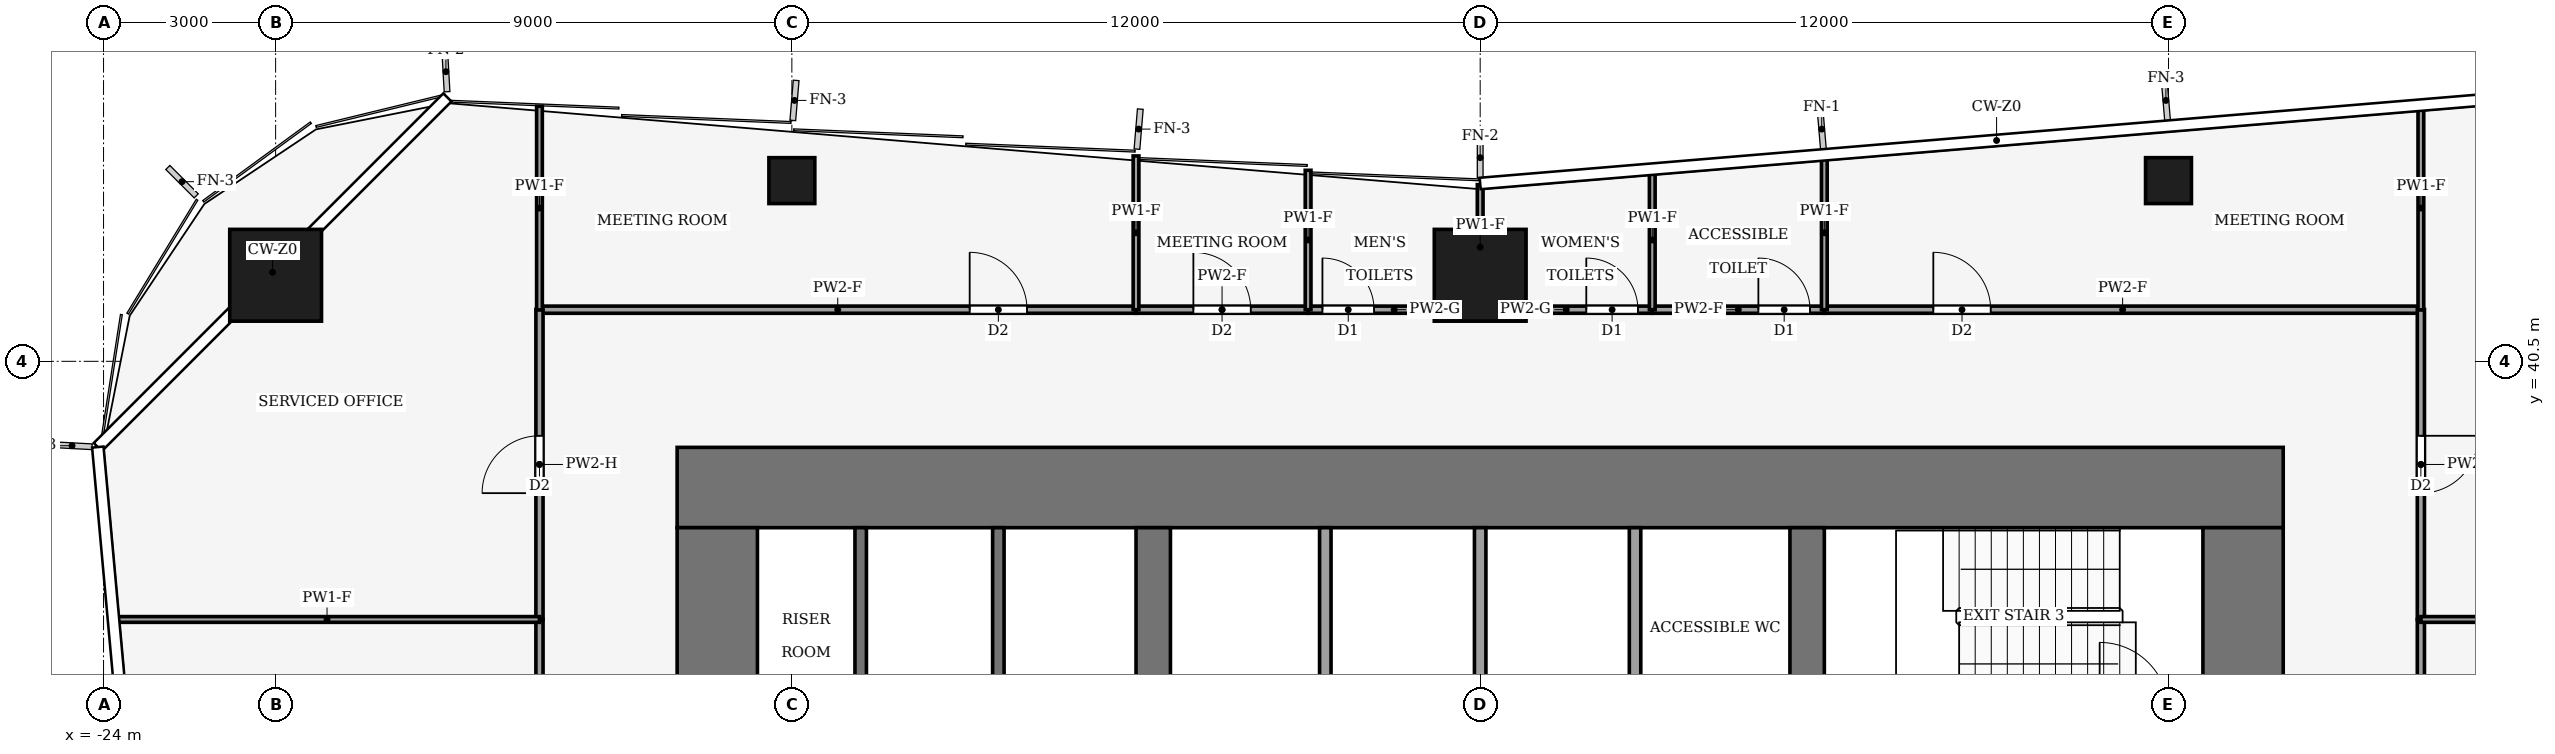
"""IFC4 building model, lengths in metres.
Left out: names, types, materials, properties, quantities, classifications, styles, units other than length and angle.
Written with IfcOpenShell. Run it as: python <this file> out.ifc"""

import sys

from ifc_helpers import new_model, si_unit, direction, frame, frame_2d, origin, origin_2d, place, context, subcontext, project, spatial, rectangle, hollow_rectangle, extrude, element, fill, save


model = new_model("IFC4")
c1 = context("Model", 3, precision=1e-05, world=origin(), true_north=direction((0.0, 1.0)))
c2 = subcontext(c1, "Body", "Model", "MODEL_VIEW")
j1 = project(units=[si_unit("LENGTHUNIT", "METRE"), si_unit("PLANEANGLEUNIT", "RADIAN")], contexts=[c1])
p1 = place(None, origin())
s1 = spatial("IfcSite", under=j1, at=p1, CompositionType="ELEMENT")
p2 = place(p1, origin())
s2 = spatial("IfcBuilding", under=s1, at=p2, CompositionType="ELEMENT")
p3 = place(p2, frame((0.0, 0.0, 26.0)))
s3 = spatial("IfcBuildingStorey", under=s2, at=p3, CompositionType="ELEMENT", Elevation=26.0)
p4 = place(p3, frame((-14.0, 38.3, -0.13), z_axis=(0.0, 0.0, 1.0), x_axis=(1.0, 0.0, 0.0)))
e1 = element("IfcWall", 1, at=p4, inside=s3, PredefinedType="SHEAR", context=c2, shape_type="SweptSolid", body=[
    extrude(rectangle(XDim=28.0, YDim=1.4, at=frame_2d((14.0, 0.0))), origin(), (0.0, 0.0, 1.0), 4.0),
])
p5 = place(p3, frame((-13.3, 18.4, -0.13), z_axis=(0.0, 0.0, 1.0), x_axis=(0.0, 1.0, 0.0)))
e2 = element("IfcWall", 2, at=p5, inside=s3, PredefinedType="SHEAR", context=c2, shape_type="SweptSolid", body=[
    extrude(rectangle(XDim=19.2, YDim=1.4, at=frame_2d((9.6, 0.0))), origin(), (0.0, 0.0, 1.0), 4.0),
])
p6 = place(p5, frame((2.8, 0.0, 0.13)))
e3 = element("IfcOpeningElement", 3, at=p6, cuts=e2, PredefinedType="OPENING", context=c2, shape_type="SweptSolid", body=[
    extrude(rectangle(XDim=2.4, YDim=2.4, at=frame_2d((1.2, 1.2))), frame((0.0, 0.71, 0.0), z_axis=(0.0, -1.0, 0.0), x_axis=(1.0, 0.0, 0.0)), (0.0, 0.0, 1.0), 1.42),
])
p7 = place(p5, frame((13.4, 0.0, 0.13)))
e4 = element("IfcOpeningElement", 4, at=p7, cuts=e2, PredefinedType="OPENING", context=c2, shape_type="SweptSolid", body=[
    extrude(rectangle(XDim=1.4, YDim=2.2, at=frame_2d((0.7, 1.1))), frame((0.0, 0.71, 0.0), z_axis=(0.0, -1.0, 0.0), x_axis=(1.0, 0.0, 0.0)), (0.0, 0.0, 1.0), 1.42),
])
p8 = place(p3, frame((13.3, 18.4, -0.13), z_axis=(0.0, 0.0, 1.0), x_axis=(0.0, 1.0, 0.0)))
e5 = element("IfcWall", 5, at=p8, inside=s3, PredefinedType="SHEAR", context=c2, shape_type="SweptSolid", body=[
    extrude(rectangle(XDim=19.2, YDim=1.4, at=frame_2d((9.6, 0.0))), origin(), (0.0, 0.0, 1.0), 4.0),
])
p9 = place(p8, frame((2.8, 0.0, 0.13)))
e6 = element("IfcOpeningElement", 6, at=p9, cuts=e5, PredefinedType="OPENING", context=c2, shape_type="SweptSolid", body=[
    extrude(rectangle(XDim=2.4, YDim=2.4, at=frame_2d((1.2, 1.2))), frame((0.0, 0.71, 0.0), z_axis=(0.0, -1.0, 0.0), x_axis=(1.0, 0.0, 0.0)), (0.0, 0.0, 1.0), 1.42),
])
p10 = place(p8, frame((13.3, 0.0, 0.13)))
e7 = element("IfcOpeningElement", 7, at=p10, cuts=e5, PredefinedType="OPENING", context=c2, shape_type="SweptSolid", body=[
    extrude(rectangle(XDim=2.4, YDim=2.4, at=frame_2d((1.2, 1.2))), frame((0.0, 0.71, 0.0), z_axis=(0.0, -1.0, 0.0), x_axis=(1.0, 0.0, 0.0)), (0.0, 0.0, 1.0), 1.42),
])
p11 = place(p3, frame((-5.7, 18.4, -0.13), z_axis=(0.0, 0.0, 1.0), x_axis=(0.0, 1.0, 0.0)))
e8 = element("IfcWall", 8, at=p11, inside=s3, PredefinedType="SHEAR", context=c2, shape_type="SweptSolid", body=[
    extrude(rectangle(XDim=19.2, YDim=0.6, at=frame_2d((9.6, 0.0))), origin(), (0.0, 0.0, 1.0), 4.0),
])
p12 = place(p11, frame((8.35, 0.0, 0.13)))
e9 = element("IfcOpeningElement", 9, at=p12, cuts=e8, PredefinedType="OPENING", context=c2, shape_type="SweptSolid", body=[
    extrude(rectangle(XDim=0.9, YDim=2.1, at=frame_2d((0.45, 1.05))), frame((0.0, 0.31, 0.0), z_axis=(0.0, -1.0, 0.0), x_axis=(1.0, 0.0, 0.0)), (0.0, 0.0, 1.0), 0.62),
])
p13 = place(p3, frame((5.7, 18.4, -0.13), z_axis=(0.0, 0.0, 1.0), x_axis=(0.0, 1.0, 0.0)))
e10 = element("IfcWall", 10, at=p13, inside=s3, PredefinedType="SHEAR", context=c2, shape_type="SweptSolid", body=[
    extrude(rectangle(XDim=19.2, YDim=0.6, at=frame_2d((9.6, 0.0))), origin(), (0.0, 0.0, 1.0), 4.0),
])
p14 = place(p13, frame((13.3, 0.0, 0.13)))
e11 = element("IfcOpeningElement", 11, at=p14, cuts=e10, PredefinedType="OPENING", context=c2, shape_type="SweptSolid", body=[
    extrude(rectangle(XDim=2.4, YDim=2.4, at=frame_2d((1.2, 1.2))), frame((0.0, 0.31, 0.0), z_axis=(0.0, -1.0, 0.0), x_axis=(1.0, 0.0, 0.0)), (0.0, 0.0, 1.0), 0.62),
])
for number, where, z_axis, x_axis in (
    (12, (-21.0, 42.0, 0.0), (0.0, 0.0, 1.0), (1.0, 0.0, 0.0)),
    (13, (0.0, 42.0, 0.0), (0.0, 0.0, 1.0), (1.0, 0.0, 0.0)),
):
    element("IfcColumn", number, at=place(p3, frame(where, z_axis=z_axis, x_axis=x_axis)), inside=s3, PredefinedType="COLUMN", context=c2, shape_type="SweptSolid", body=[
        extrude(hollow_rectangle(XDim=1.6, YDim=1.6, WallThickness=0.09, at=origin_2d()), origin(), (0.0, 0.0, 1.0), 4.0),
    ])
for number, where, z_axis, x_axis in (
    (14, (-12.0, 43.65, 0.0), (0.0, 0.0, 1.0), (1.0, 0.0, 0.0)),
    (15, (12.0, 43.65, 0.0), (0.0, 0.0, 1.0), (1.0, 0.0, 0.0)),
):
    element("IfcColumn", number, at=place(p3, frame(where, z_axis=z_axis, x_axis=x_axis)), inside=s3, PredefinedType="COLUMN", context=c2, shape_type="SweptSolid", body=[
        extrude(hollow_rectangle(XDim=0.8, YDim=0.8, WallThickness=0.04, at=origin_2d()), origin(), (0.0, 0.0, 1.0), 4.0),
    ])
for number, where, z_axis, x_axis in (
    (16, (-10.8, 34.0, 0.0), (0.0, 0.0, 1.0), (0.0, 1.0, 0.0)),
    (17, (-8.4, 34.0, 0.0), (0.0, 0.0, 1.0), (0.0, 1.0, 0.0)),
    (18, (-2.7, 34.0, 0.0), (0.0, 0.0, 1.0), (0.0, 1.0, 0.0)),
    (19, (0.0, 34.0, 0.0), (0.0, 0.0, 1.0), (0.0, 1.0, 0.0)),
    (20, (2.7, 34.0, 0.0), (0.0, 0.0, 1.0), (0.0, 1.0, 0.0)),
):
    element("IfcWall", number, at=place(p3, frame(where, z_axis=z_axis, x_axis=x_axis)), inside=s3, PredefinedType="PARTITIONING", context=c2, shape_type="SweptSolid", body=[
        extrude(rectangle(XDim=3.6, YDim=0.2, at=frame_2d((1.8, 0.0))), origin(), (0.0, 0.0, 1.0), 3.87),
    ])
p15 = place(p3, frame((-16.4, 41.4, 0.0), z_axis=(0.0, 0.0, 1.0), x_axis=(1.0, 0.0, 0.0)))
e21 = element("IfcWall", 21, at=p15, inside=s3, PredefinedType="PARTITIONING", context=c2, shape_type="SweptSolid", body=[
    extrude(rectangle(XDim=10.4, YDim=0.125, at=frame_2d((5.2, 0.0))), origin(), (0.0, 0.0, 1.0), 3.54),
])
p16 = place(p15, frame((7.5, 0.0, 0.0)))
e22 = element("IfcOpeningElement", 22, at=p16, cuts=e21, PredefinedType="OPENING", context=c2, shape_type="SweptSolid", body=[
    extrude(rectangle(XDim=1.0, YDim=2.1, at=frame_2d((0.5, 1.05))), frame((0.0, 0.073, 0.0), z_axis=(0.0, -1.0, 0.0), x_axis=(1.0, 0.0, 0.0)), (0.0, 0.0, 1.0), 0.145),
])
p17 = place(p3, frame((-6.0, 41.4, 0.0), z_axis=(0.0, 0.0, 1.0), x_axis=(1.0, 0.0, 0.0)))
e23 = element("IfcWall", 23, at=p17, inside=s3, PredefinedType="PARTITIONING", context=c2, shape_type="SweptSolid", body=[
    extrude(rectangle(XDim=3.0, YDim=0.125, at=frame_2d((1.5, 0.0))), origin(), (0.0, 0.0, 1.0), 3.54),
])
p18 = place(p17, frame((1.0, 0.0, 0.0)))
e24 = element("IfcOpeningElement", 24, at=p18, cuts=e23, PredefinedType="OPENING", context=c2, shape_type="SweptSolid", body=[
    extrude(rectangle(XDim=1.0, YDim=2.1, at=frame_2d((0.5, 1.05))), frame((0.0, 0.073, 0.0), z_axis=(0.0, -1.0, 0.0), x_axis=(1.0, 0.0, 0.0)), (0.0, 0.0, 1.0), 0.145),
])
p19 = place(p3, frame((-3.0, 41.4, 0.0), z_axis=(0.0, 0.0, 1.0), x_axis=(1.0, 0.0, 0.0)))
e25 = element("IfcWall", 25, at=p19, inside=s3, PredefinedType="PARTITIONING", context=c2, shape_type="SweptSolid", body=[
    extrude(rectangle(XDim=3.0, YDim=0.125, at=frame_2d((1.5, 0.0))), origin(), (0.0, 0.0, 1.0), 3.87),
])
p20 = place(p19, frame((0.25, 0.0, 0.0)))
e26 = element("IfcOpeningElement", 26, at=p20, cuts=e25, PredefinedType="OPENING", context=c2, shape_type="SweptSolid", body=[
    extrude(rectangle(XDim=0.9, YDim=2.1, at=frame_2d((0.45, 1.05))), frame((0.0, 0.073, 0.0), z_axis=(0.0, -1.0, 0.0), x_axis=(1.0, 0.0, 0.0)), (0.0, 0.0, 1.0), 0.145),
])
p21 = place(p3, frame((0.0, 41.4, 0.0), z_axis=(0.0, 0.0, 1.0), x_axis=(1.0, 0.0, 0.0)))
e27 = element("IfcWall", 27, at=p21, inside=s3, PredefinedType="PARTITIONING", context=c2, shape_type="SweptSolid", body=[
    extrude(rectangle(XDim=3.0, YDim=0.125, at=frame_2d((1.5, 0.0))), origin(), (0.0, 0.0, 1.0), 3.87),
])
p22 = place(p21, frame((1.85, 0.0, 0.0)))
e28 = element("IfcOpeningElement", 28, at=p22, cuts=e27, PredefinedType="OPENING", context=c2, shape_type="SweptSolid", body=[
    extrude(rectangle(XDim=0.9, YDim=2.1, at=frame_2d((0.45, 1.05))), frame((0.0, 0.073, 0.0), z_axis=(0.0, -1.0, 0.0), x_axis=(1.0, 0.0, 0.0)), (0.0, 0.0, 1.0), 0.145),
])
p23 = place(p3, frame((3.0, 41.4, 0.0), z_axis=(0.0, 0.0, 1.0), x_axis=(1.0, 0.0, 0.0)))
e29 = element("IfcWall", 29, at=p23, inside=s3, PredefinedType="PARTITIONING", context=c2, shape_type="SweptSolid", body=[
    extrude(rectangle(XDim=3.0, YDim=0.125, at=frame_2d((1.5, 0.0))), origin(), (0.0, 0.0, 1.0), 3.54),
])
p24 = place(p23, frame((1.85, 0.0, 0.0)))
e30 = element("IfcOpeningElement", 30, at=p24, cuts=e29, PredefinedType="OPENING", context=c2, shape_type="SweptSolid", body=[
    extrude(rectangle(XDim=0.9, YDim=2.1, at=frame_2d((0.45, 1.05))), frame((0.0, 0.073, 0.0), z_axis=(0.0, -1.0, 0.0), x_axis=(1.0, 0.0, 0.0)), (0.0, 0.0, 1.0), 0.145),
])
p25 = place(p3, frame((6.0, 41.4, 0.0), z_axis=(0.0, 0.0, 1.0), x_axis=(1.0, 0.0, 0.0)))
e31 = element("IfcWall", 31, at=p25, inside=s3, PredefinedType="PARTITIONING", context=c2, shape_type="SweptSolid", body=[
    extrude(rectangle(XDim=10.4, YDim=0.125, at=frame_2d((5.2, 0.0))), origin(), (0.0, 0.0, 1.0), 3.54),
])
p26 = place(p25, frame((1.9, 0.0, 0.0)))
e32 = element("IfcOpeningElement", 32, at=p26, cuts=e31, PredefinedType="OPENING", context=c2, shape_type="SweptSolid", body=[
    extrude(rectangle(XDim=1.0, YDim=2.1, at=frame_2d((0.5, 1.05))), frame((0.0, 0.073, 0.0), z_axis=(0.0, -1.0, 0.0), x_axis=(1.0, 0.0, 0.0)), (0.0, 0.0, 1.0), 0.145),
])
p27 = place(p3, frame((-16.4, 24.0, 0.0), z_axis=(0.0, 0.0, 1.0), x_axis=(0.0, 1.0, 0.0)))
e33 = element("IfcWall", 33, at=p27, inside=s3, PredefinedType="PARTITIONING", context=c2, shape_type="SweptSolid", body=[
    extrude(rectangle(XDim=12.0, YDim=0.125, at=frame_2d((6.0, 0.0))), origin(), (0.0, 0.0, 1.0), 3.48),
])
p28 = place(p27, frame((5.5, 0.0, 0.0)))
e34 = element("IfcOpeningElement", 34, at=p28, cuts=e33, PredefinedType="OPENING", context=c2, shape_type="SweptSolid", body=[
    extrude(rectangle(XDim=1.0, YDim=2.1, at=frame_2d((0.5, 1.05))), frame((0.0, 0.073, 0.0), z_axis=(0.0, -1.0, 0.0), x_axis=(1.0, 0.0, 0.0)), (0.0, 0.0, 1.0), 0.145),
])
p29 = place(p3, frame((-16.4, 36.0, 0.0), z_axis=(0.0, 0.0, 1.0), x_axis=(0.0, 1.0, 0.0)))
e35 = element("IfcWall", 35, at=p29, inside=s3, PredefinedType="PARTITIONING", context=c2, shape_type="SweptSolid", body=[
    extrude(rectangle(XDim=5.404, YDim=0.125, at=frame_2d((2.702, 0.0))), origin(), (0.0, 0.0, 1.0), 3.14),
])
p30 = place(p29, frame((2.202, 0.0, 0.0)))
e36 = element("IfcOpeningElement", 36, at=p30, cuts=e35, PredefinedType="OPENING", context=c2, shape_type="SweptSolid", body=[
    extrude(rectangle(XDim=1.0, YDim=2.1, at=frame_2d((0.5, 1.05))), frame((0.0, 0.073, 0.0), z_axis=(0.0, -1.0, 0.0), x_axis=(1.0, 0.0, 0.0)), (0.0, 0.0, 1.0), 0.145),
])
p31 = place(p3, frame((16.4, 36.0, 0.0), z_axis=(0.0, 0.0, 1.0), x_axis=(0.0, -1.0, 0.0)))
e37 = element("IfcWall", 37, at=p31, inside=s3, PredefinedType="PARTITIONING", context=c2, shape_type="SweptSolid", body=[
    extrude(rectangle(XDim=3.0, YDim=0.125, at=frame_2d((1.5, 0.0))), origin(), (0.0, 0.0, 1.0), 3.48),
])
p32 = place(p31, frame((1.0, 0.0, 0.0)))
e38 = element("IfcOpeningElement", 38, at=p32, cuts=e37, PredefinedType="OPENING", context=c2, shape_type="SweptSolid", body=[
    extrude(rectangle(XDim=1.0, YDim=2.1, at=frame_2d((0.5, 1.05))), frame((0.0, 0.073, 0.0), z_axis=(0.0, -1.0, 0.0), x_axis=(1.0, 0.0, 0.0)), (0.0, 0.0, 1.0), 0.145),
])
p33 = place(p3, frame((16.4, 41.404, 0.0), z_axis=(0.0, 0.0, 1.0), x_axis=(0.0, -1.0, 0.0)))
e39 = element("IfcWall", 39, at=p33, inside=s3, PredefinedType="PARTITIONING", context=c2, shape_type="SweptSolid", body=[
    extrude(rectangle(XDim=5.404, YDim=0.125, at=frame_2d((2.702, 0.0))), origin(), (0.0, 0.0, 1.0), 3.14),
])
p34 = place(p33, frame((2.202, 0.0, 0.0)))
e40 = element("IfcOpeningElement", 40, at=p34, cuts=e39, PredefinedType="OPENING", context=c2, shape_type="SweptSolid", body=[
    extrude(rectangle(XDim=1.0, YDim=2.1, at=frame_2d((0.5, 1.05))), frame((0.0, 0.073, 0.0), z_axis=(0.0, -1.0, 0.0), x_axis=(1.0, 0.0, 0.0)), (0.0, 0.0, 1.0), 0.145),
])
p35 = place(p3, frame((-6.0, 41.4, 0.0), z_axis=(0.0, 0.0, 1.0), x_axis=(0.0, 1.0, 0.0)))
e41 = element("IfcWall", 41, at=p35, inside=s3, PredefinedType="PARTITIONING", context=c2, shape_type="SweptSolid", body=[
    extrude(rectangle(XDim=2.68, YDim=0.1, at=frame_2d((1.34, 0.0))), origin(), (0.0, 0.0, 1.0), 3.04),
])
p36 = place(p3, frame((-16.4, 44.947, 0.0), z_axis=(0.0, 0.0, 1.0), x_axis=(0.0, -1.0, 0.0)))
e42 = element("IfcWall", 42, at=p36, inside=s3, PredefinedType="PARTITIONING", context=c2, shape_type="SweptSolid", body=[
    extrude(rectangle(XDim=3.551, YDim=0.1, at=frame_2d((1.775, 0.0))), origin(), (0.0, 0.0, 1.0), 3.04),
])
p37 = place(p3, frame((-3.0, 41.4, 0.0), z_axis=(0.0, 0.0, 1.0), x_axis=(0.0, 1.0, 0.0)))
e43 = element("IfcWall", 43, at=p37, inside=s3, PredefinedType="PARTITIONING", context=c2, shape_type="SweptSolid", body=[
    extrude(rectangle(XDim=2.43, YDim=0.1, at=frame_2d((1.215, 0.0))), origin(), (0.0, 0.0, 1.0), 3.04),
])
p38 = place(p3, frame((0.0, 41.4, 0.0), z_axis=(0.0, 0.0, 1.0), x_axis=(0.0, 1.0, 0.0)))
e44 = element("IfcWall", 44, at=p38, inside=s3, PredefinedType="PARTITIONING", context=c2, shape_type="SweptSolid", body=[
    extrude(rectangle(XDim=2.18, YDim=0.1, at=frame_2d((1.09, 0.0))), origin(), (0.0, 0.0, 1.0), 3.04),
])
p39 = place(p3, frame((3.0, 41.4, 0.0), z_axis=(0.0, 0.0, 1.0), x_axis=(0.0, 1.0, 0.0)))
e45 = element("IfcWall", 45, at=p39, inside=s3, PredefinedType="PARTITIONING", context=c2, shape_type="SweptSolid", body=[
    extrude(rectangle(XDim=2.43, YDim=0.1, at=frame_2d((1.215, 0.0))), origin(), (0.0, 0.0, 1.0), 3.04),
])
p40 = place(p3, frame((6.0, 41.4, 0.0), z_axis=(0.0, 0.0, 1.0), x_axis=(0.0, 1.0, 0.0)))
e46 = element("IfcWall", 46, at=p40, inside=s3, PredefinedType="PARTITIONING", context=c2, shape_type="SweptSolid", body=[
    extrude(rectangle(XDim=2.68, YDim=0.1, at=frame_2d((1.34, 0.0))), origin(), (0.0, 0.0, 1.0), 3.04),
])
p41 = place(p3, frame((16.4, 41.396, 0.0), z_axis=(0.0, 0.0, 1.0), x_axis=(0.0, 1.0, 0.0)))
e47 = element("IfcWall", 47, at=p41, inside=s3, PredefinedType="PARTITIONING", context=c2, shape_type="SweptSolid", body=[
    extrude(rectangle(XDim=3.551, YDim=0.1, at=frame_2d((1.775, 0.0))), origin(), (0.0, 0.0, 1.0), 3.04),
])
for number, where, z_axis, x_axis in (
    (48, (-16.4, 36.0, 0.0), (0.0, 0.0, 1.0), (-1.0, 0.0, 0.0)),
    (49, (23.807, 36.0, 0.0), (0.0, 0.0, 1.0), (-1.0, 0.0, 0.0)),
):
    element("IfcWall", number, at=place(p3, frame(where, z_axis=z_axis, x_axis=x_axis)), inside=s3, PredefinedType="PARTITIONING", context=c2, shape_type="SweptSolid", body=[
        extrude(rectangle(XDim=7.407, YDim=0.1, at=frame_2d((3.704, 0.0))), origin(), (0.0, 0.0, 1.0), 3.04),
    ])
p42 = place(p16, origin())
e50 = element("IfcDoor", 50, at=p42, inside=s3, OperationType="SINGLE_SWING_RIGHT", PredefinedType="DOOR", context=c2, shape_type="SweptSolid", body=[
    extrude(rectangle(XDim=1.0, YDim=2.1, at=frame_2d((0.5, 1.05))), frame((0.0, 0.025, 0.0), z_axis=(0.0, -1.0, 0.0), x_axis=(1.0, 0.0, 0.0)), (0.0, 0.0, 1.0), 0.05),
])
fill(e22, e50)
p43 = place(p18, origin())
e51 = element("IfcDoor", 51, at=p43, inside=s3, OperationType="SINGLE_SWING_LEFT", PredefinedType="DOOR", context=c2, shape_type="SweptSolid", body=[
    extrude(rectangle(XDim=1.0, YDim=2.1, at=frame_2d((0.5, 1.05))), frame((0.0, 0.025, 0.0), z_axis=(0.0, -1.0, 0.0), x_axis=(1.0, 0.0, 0.0)), (0.0, 0.0, 1.0), 0.05),
])
fill(e24, e51)
p44 = place(p20, origin())
e52 = element("IfcDoor", 52, at=p44, inside=s3, OperationType="SINGLE_SWING_LEFT", PredefinedType="DOOR", context=c2, shape_type="SweptSolid", body=[
    extrude(rectangle(XDim=0.9, YDim=2.1, at=frame_2d((0.45, 1.05))), frame((0.0, 0.025, 0.0), z_axis=(0.0, -1.0, 0.0), x_axis=(1.0, 0.0, 0.0)), (0.0, 0.0, 1.0), 0.05),
])
fill(e26, e52)
p45 = place(p22, origin())
e53 = element("IfcDoor", 53, at=p45, inside=s3, OperationType="SINGLE_SWING_RIGHT", PredefinedType="DOOR", context=c2, shape_type="SweptSolid", body=[
    extrude(rectangle(XDim=0.9, YDim=2.1, at=frame_2d((0.45, 1.05))), frame((0.0, 0.025, 0.0), z_axis=(0.0, -1.0, 0.0), x_axis=(1.0, 0.0, 0.0)), (0.0, 0.0, 1.0), 0.05),
])
fill(e28, e53)
p46 = place(p24, origin())
e54 = element("IfcDoor", 54, at=p46, inside=s3, OperationType="SINGLE_SWING_RIGHT", PredefinedType="DOOR", context=c2, shape_type="SweptSolid", body=[
    extrude(rectangle(XDim=0.9, YDim=2.1, at=frame_2d((0.45, 1.05))), frame((0.0, 0.025, 0.0), z_axis=(0.0, -1.0, 0.0), x_axis=(1.0, 0.0, 0.0)), (0.0, 0.0, 1.0), 0.05),
])
fill(e30, e54)
p47 = place(p26, origin())
e55 = element("IfcDoor", 55, at=p47, inside=s3, OperationType="SINGLE_SWING_LEFT", PredefinedType="DOOR", context=c2, shape_type="SweptSolid", body=[
    extrude(rectangle(XDim=1.0, YDim=2.1, at=frame_2d((0.5, 1.05))), frame((0.0, 0.025, 0.0), z_axis=(0.0, -1.0, 0.0), x_axis=(1.0, 0.0, 0.0)), (0.0, 0.0, 1.0), 0.05),
])
fill(e32, e55)
p48 = place(p30, origin())
e56 = element("IfcDoor", 56, at=p48, inside=s3, OperationType="SINGLE_SWING_RIGHT", PredefinedType="DOOR", context=c2, shape_type="SweptSolid", body=[
    extrude(rectangle(XDim=1.0, YDim=2.1, at=frame_2d((0.5, 1.05))), frame((0.0, 0.025, 0.0), z_axis=(0.0, -1.0, 0.0), x_axis=(1.0, 0.0, 0.0)), (0.0, 0.0, 1.0), 0.05),
])
fill(e36, e56)
p49 = place(p34, origin())
e57 = element("IfcDoor", 57, at=p49, inside=s3, OperationType="SINGLE_SWING_LEFT", PredefinedType="DOOR", context=c2, shape_type="SweptSolid", body=[
    extrude(rectangle(XDim=1.0, YDim=2.1, at=frame_2d((0.5, 1.05))), frame((0.0, 0.025, 0.0), z_axis=(0.0, -1.0, 0.0), x_axis=(1.0, 0.0, 0.0)), (0.0, 0.0, 1.0), 0.05),
])
fill(e40, e57)
save(model, sys.argv[1])
